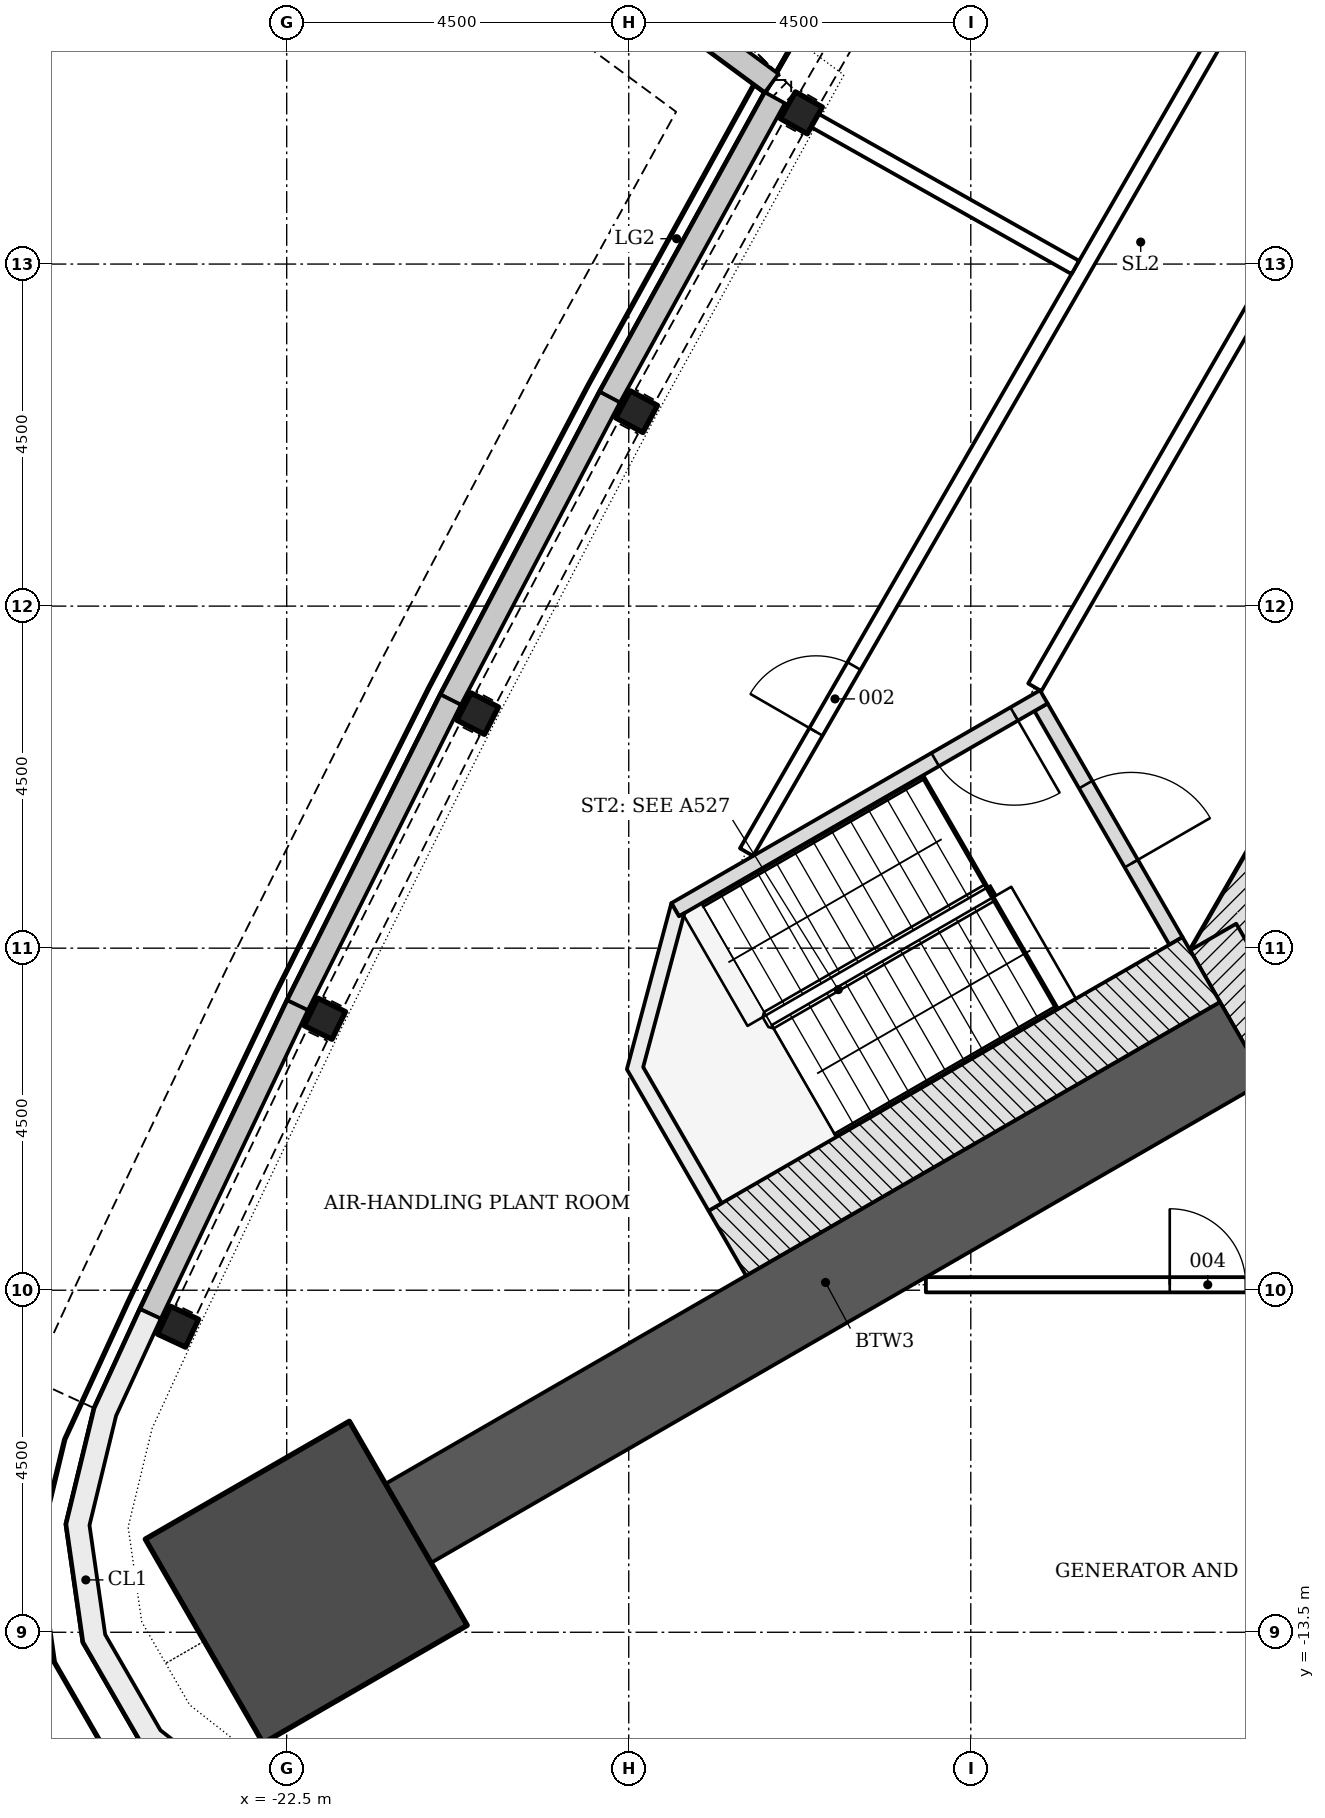
"""IFC4 building model, lengths in metres.
Left out: names, types, materials, properties, quantities, classifications, styles, units other than length and angle.
Written with IfcOpenShell. Run it as: python <this file> out.ifc"""

import sys

from ifc_helpers import new_model, si_unit, direction, frame, frame_2d, origin, origin_2d, place, context, subcontext, project, spatial, polyline, rectangle, i_section, outline, extrude, element, fill, save


model = new_model("IFC4")
c1 = context("Model", 3, precision=1e-05, world=origin(), true_north=direction((0.0, 1.0)))
c2 = subcontext(c1, "Body", "Model", "MODEL_VIEW")
j1 = project(units=[si_unit("LENGTHUNIT", "METRE"), si_unit("PLANEANGLEUNIT", "RADIAN")], contexts=[c1])
p1 = place(None, origin())
s1 = spatial("IfcSite", under=j1, at=p1, CompositionType="ELEMENT")
p2 = place(p1, origin())
s2 = spatial("IfcBuilding", under=s1, at=p2, CompositionType="ELEMENT")
p3 = place(p2, frame((0.0, 0.0, 87.0)))
s3 = spatial("IfcBuildingStorey", under=s2, at=p3, CompositionType="ELEMENT", Elevation=87.0)
p4 = place(p3, frame((-1.083, 11.281, -0.3), z_axis=(0.0, 0.0, 1.0), x_axis=(-0.500001446645, -0.866024568562, 0.0)))
e1 = element("IfcWall", 1, at=p4, inside=s3, PredefinedType="SHEAR", context=c2, shape_type="SweptSolid", body=[
    extrude(rectangle(XDim=18.458, YDim=0.7, at=frame_2d((9.229, 0.0))), origin(), (0.0, 0.0, 1.0), 4.6),
])
p5 = place(p4, frame((8.979, 0.0, 0.3)))
e2 = element("IfcOpeningElement", 2, at=p5, cuts=e1, PredefinedType="OPENING", context=c2, shape_type="SweptSolid", body=[
    extrude(rectangle(XDim=1.2, YDim=2.1, at=frame_2d((0.6, 1.05))), frame((0.0, 0.36, 0.0), z_axis=(0.0, -1.0, 0.0), x_axis=(1.0, 0.0, 0.0)), (0.0, 0.0, 1.0), 0.72),
])
p6 = place(p4, frame((11.029, 0.0, 0.3)))
e3 = element("IfcOpeningElement", 3, at=p6, cuts=e1, PredefinedType="OPENING", context=c2, shape_type="SweptSolid", body=[
    extrude(rectangle(XDim=1.2, YDim=2.1, at=frame_2d((0.6, 1.05))), frame((0.0, 0.36, 0.0), z_axis=(0.0, -1.0, 0.0), x_axis=(1.0, 0.0, 0.0)), (0.0, 0.0, 1.0), 0.72),
])
p7 = place(p3, frame((-10.311, -4.353, -0.3), z_axis=(0.0, 0.0, 1.0), x_axis=(0.500042739161, -0.866000726912, 0.0)))
e4 = element("IfcWall", 4, at=p7, inside=s3, PredefinedType="SHEAR", context=c2, shape_type="SweptSolid", body=[
    extrude(rectangle(XDim=2.771, YDim=0.7, at=frame_2d((1.386, 0.0))), origin(), (0.0, 0.0, 1.0), 4.6),
])
p8 = place(p3, frame((-9.922, -5.728, -0.3), z_axis=(0.0, 0.0, 1.0), x_axis=(-0.866029086277, -0.499993621681, 0.0)))
e5 = element("IfcWall", 5, at=p8, inside=s3, PredefinedType="SHEAR", context=c2, shape_type="SweptSolid", body=[
    extrude(rectangle(XDim=12.677, YDim=1.2, at=frame_2d((6.339, 0.0))), origin(), (0.0, 0.0, 1.0), 4.6),
])
p9 = place(p3, frame((-22.243, -12.842, -0.3), z_axis=(0.0, 0.0, 1.0), x_axis=(-0.866025403784, -0.5, 0.0)))
e6 = element("IfcColumn", 6, at=p9, inside=s3, PredefinedType="COLUMN", context=c2, shape_type="SweptSolid", body=[
    extrude(rectangle(XDim=3.1, YDim=3.1, at=origin_2d()), origin(), (0.0, 0.0, 1.0), 4.6),
])
for number, where, z_axis, x_axis in (
    (7, (-15.729, 6.49, -0.3), (0.0, 0.0, 1.0), (-0.491, -0.871, 0.0)),
    (8, (-17.897, 2.558, -0.3), (0.0, 0.0, 1.0), (-0.474, -0.88, 0.0)),
    (9, (-19.986, -1.415, -0.3), (0.0, 0.0, 1.0), (-0.457, -0.89, 0.0)),
    (10, (-21.998, -5.428, -0.3), (0.0, 0.0, 1.0), (-0.439, -0.898, 0.0)),
    (11, (-23.929, -9.48, -0.3), (0.0, 0.0, 1.0), (-0.421, -0.907, 0.0)),
):
    element("IfcColumn", number, at=place(p3, frame(where, z_axis=z_axis, x_axis=x_axis)), inside=s3, PredefinedType="COLUMN", context=c2, shape_type="SweptSolid", body=[
        extrude(i_section(OverallWidth=0.404, OverallDepth=0.406, WebThickness=0.027, FlangeThickness=0.044, FilletRadius=0.015, at=origin_2d()), origin(), (0.0, 0.0, 1.0), 4.6),
    ])
p10 = place(p3, origin())
e12 = element("IfcWall", 12, at=p10, inside=s3, PredefinedType="NOTDEFINED", context=c2, shape_type="SweptSolid", body=[
    extrude(outline(polyline([(-18.58, 8.509), (-16.208, 6.76), (-16.03, 7.001), (-18.402, 8.75), (-18.58, 8.509)])), origin(), (0.0, 0.0, 1.0), 1.2),
])
p11 = place(p3, origin())
e13 = element("IfcWall", 13, at=p11, inside=s3, PredefinedType="NOTDEFINED", context=c2, shape_type="SweptSolid", body=[
    extrude(outline(polyline([(-16.208, 6.76), (-18.381, 2.819), (-18.118, 2.674), (-15.945, 6.615), (-16.208, 6.76)])), origin(), (0.0, 0.0, 1.0), 1.2),
])
p12 = place(p3, origin())
e14 = element("IfcWall", 14, at=p12, inside=s3, PredefinedType="NOTDEFINED", context=c2, shape_type="SweptSolid", body=[
    extrude(outline(polyline([(-18.381, 2.819), (-20.476, -1.164), (-20.21, -1.303), (-18.115, 2.679), (-18.381, 2.819)])), origin(), (0.0, 0.0, 1.0), 1.2),
])
p13 = place(p3, origin())
e15 = element("IfcWall", 15, at=p13, inside=s3, PredefinedType="NOTDEFINED", context=c2, shape_type="SweptSolid", body=[
    extrude(outline(polyline([(-20.476, -1.164), (-22.492, -5.187), (-22.224, -5.321), (-20.208, -1.298), (-20.476, -1.164)])), origin(), (0.0, 0.0, 1.0), 1.2),
])
p14 = place(p3, origin())
e16 = element("IfcWall", 16, at=p14, inside=s3, PredefinedType="NOTDEFINED", context=c2, shape_type="SweptSolid", body=[
    extrude(outline(polyline([(-22.492, -5.187), (-24.428, -9.249), (-24.157, -9.378), (-22.221, -5.316), (-22.492, -5.187)])), origin(), (0.0, 0.0, 1.0), 1.2),
])
p15 = place(p3, origin())
e17 = element("IfcWall", 17, at=p15, inside=s3, PredefinedType="NOTDEFINED", context=c2, shape_type="SweptSolid", body=[
    extrude(outline(polyline([(-24.428, -9.249), (-25.03, -10.553), (-25.4, -12.077), (-25.177, -13.63), (-24.392, -14.989), (-23.159, -15.958), (-21.654, -16.4), (-20.224, -16.531), (-20.196, -16.232), (-21.597, -16.104), (-23.019, -15.687), (-24.161, -14.789), (-24.888, -13.53), (-25.094, -12.092), (-24.745, -10.652), (-24.156, -9.374), (-24.428, -9.249)])), origin(), (0.0, 0.0, 1.0), 4.3),
])
p16 = place(p3, frame((-12.576, -1.331, -0.3), z_axis=(0.0, 0.0, 1.0), x_axis=(0.499970499736, -0.8660424351, 0.0)))
e18 = element("IfcWall", 18, at=p16, inside=s3, PredefinedType="SHEAR", context=c2, shape_type="SweptSolid", body=[
    extrude(rectangle(XDim=3.55, YDim=0.2, at=frame_2d((1.775, 0.0))), origin(), (0.0, 0.0, 1.0), 4.6),
])
p17 = place(p16, frame((1.175, 0.0, 0.3)))
e19 = element("IfcOpeningElement", 19, at=p17, cuts=e18, PredefinedType="OPENING", context=c2, shape_type="SweptSolid", body=[
    extrude(rectangle(XDim=1.2, YDim=2.1, at=frame_2d((0.6, 1.05))), frame((0.0, 0.11, 0.0), z_axis=(0.0, -1.0, 0.0), x_axis=(1.0, 0.0, 0.0)), (0.0, 0.0, 1.0), 0.22),
])
p18 = place(p3, frame((-12.539, -1.194, -0.3), z_axis=(0.0, 0.0, 1.0), x_axis=(-0.866045472092, -0.499965239061, 0.0)))
e20 = element("IfcWall", 20, at=p18, inside=s3, PredefinedType="SHEAR", context=c2, shape_type="SweptSolid", body=[
    extrude(rectangle(XDim=5.6, YDim=0.2, at=frame_2d((2.8, 0.0))), origin(), (0.0, 0.0, 1.0), 4.6),
])
p19 = place(p18, frame((0.45, 0.0, 0.3)))
e21 = element("IfcOpeningElement", 21, at=p19, cuts=e20, PredefinedType="OPENING", context=c2, shape_type="SweptSolid", body=[
    extrude(rectangle(XDim=1.2, YDim=2.1, at=frame_2d((0.6, 1.05))), frame((0.0, 0.11, 0.0), z_axis=(0.0, -1.0, 0.0), x_axis=(1.0, 0.0, 0.0)), (0.0, 0.0, 1.0), 0.22),
])
p20 = place(p3, frame((-10.468, -4.782, -0.3), z_axis=(0.0, 0.0, 1.0), x_axis=(-0.866018442252, -0.500012057535, 0.0)))
e22 = element("IfcWall", 22, at=p20, inside=s3, PredefinedType="SHEAR", context=c2, shape_type="SweptSolid", body=[
    extrude(rectangle(XDim=7.2, YDim=0.986, at=frame_2d((3.6, 0.0))), origin(), (0.0, 0.0, 1.0), 4.6),
])
p21 = place(p3, frame((0.0, 0.0, -0.3)))
e23 = element("IfcWall", 23, at=p21, inside=s3, PredefinedType="SHEAR", context=c2, shape_type="SweptSolid", body=[
    extrude(outline(polyline([(-17.439, -3.907), (-18.025, -6.093), (-16.95, -7.955), (-16.777, -7.855), (-17.81, -6.065), (-17.267, -4.039), (-17.339, -4.081), (-17.339, -4.081), (-17.339, -4.081), (-17.339, -4.081), (-17.339, -4.081), (-17.339, -4.081), (-17.339, -4.081), (-17.339, -4.081), (-17.339, -4.081), (-17.339, -4.081), (-17.339, -4.081), (-17.339, -4.081), (-17.339, -4.081), (-17.339, -4.081), (-17.339, -4.081), (-17.339, -4.081), (-17.339, -4.081), (-17.439, -3.907)])), origin(), (0.0, 0.0, 1.0), 4.6),
])
p22 = place(p3, frame((-0.687, 19.667, 0.0), z_axis=(0.0, 0.0, 1.0), x_axis=(-0.500000491645, -0.866025119933, 0.0)))
e24 = element("IfcWall", 24, at=p22, inside=s3, PredefinedType="PARTITIONING", context=c2, shape_type="SweptSolid", body=[
    extrude(rectangle(XDim=23.943, YDim=0.2, at=frame_2d((11.971, 0.0))), origin(), (0.0, 0.0, 1.0), 3.678),
])
p23 = place(p22, frame((16.287, 0.0, 0.0)))
e25 = element("IfcOpeningElement", 25, at=p23, cuts=e24, PredefinedType="OPENING", context=c2, shape_type="SweptSolid", body=[
    extrude(rectangle(XDim=1.2, YDim=2.1, at=frame_2d((0.6, 1.05))), frame((0.0, 0.11, 0.0), z_axis=(0.0, -1.0, 0.0), x_axis=(1.0, 0.0, 0.0)), (0.0, 0.0, 1.0), 0.22),
])
p24 = place(p3, frame((-16.45, -3.237, 0.0), z_axis=(0.0, 0.0, 1.0), x_axis=(0.499997734893, 0.866026711541, 0.0)))
e26 = element("IfcWall", 26, at=p24, inside=s3, PredefinedType="PARTITIONING", context=c2, shape_type="SweptSolid", body=[
    extrude(rectangle(XDim=31.527, YDim=0.2, at=frame_2d((15.764, 0.0))), origin(), (0.0, 0.0, 1.0), 3.678),
])
p25 = place(p24, frame((19.615, 0.0, 0.0)))
e27 = element("IfcOpeningElement", 27, at=p25, cuts=e26, PredefinedType="OPENING", context=c2, shape_type="SweptSolid", body=[
    extrude(rectangle(XDim=1.0, YDim=2.1, at=frame_2d((0.5, 1.05))), frame((0.0, 0.11, 0.0), z_axis=(0.0, -1.0, 0.0), x_axis=(1.0, 0.0, 0.0)), (0.0, 0.0, 1.0), 0.22),
])
p26 = place(p24, frame((1.828, 0.0, 0.0)))
e28 = element("IfcOpeningElement", 28, at=p26, cuts=e26, PredefinedType="OPENING", context=c2, shape_type="SweptSolid", body=[
    extrude(rectangle(XDim=1.0, YDim=2.1, at=frame_2d((0.5, 1.05))), frame((0.0, 0.11, 0.0), z_axis=(0.0, -1.0, 0.0), x_axis=(1.0, 0.0, 0.0)), (0.0, 0.0, 1.0), 0.22),
])
p27 = place(p3, frame((-15.598, 6.416, 0.0), z_axis=(0.0, 0.0, 1.0), x_axis=(0.870920683573, -0.491423608433, 0.0)))
e29 = element("IfcWall", 29, at=p27, inside=s3, PredefinedType="PARTITIONING", context=c2, shape_type="SweptSolid", body=[
    extrude(rectangle(XDim=3.987, YDim=0.2, at=frame_2d((1.994, 0.0))), origin(), (0.0, 0.0, 1.0), 3.678),
])
p28 = place(p3, frame((-14.091, -8.928, 0.0), z_axis=(0.0, 0.0, 1.0), x_axis=(1.0, 0.0, 0.0)))
e30 = element("IfcWall", 30, at=p28, inside=s3, PredefinedType="PARTITIONING", context=c2, shape_type="SweptSolid", body=[
    extrude(rectangle(XDim=18.991, YDim=0.2, at=frame_2d((9.495, 0.0))), origin(), (0.0, 0.0, 1.0), 3.678),
])
p29 = place(p28, frame((3.208, 0.0, 0.0)))
e31 = element("IfcOpeningElement", 31, at=p29, cuts=e30, PredefinedType="OPENING", context=c2, shape_type="SweptSolid", body=[
    extrude(rectangle(XDim=1.0, YDim=2.1, at=frame_2d((0.5, 1.05))), frame((0.0, 0.11, 0.0), z_axis=(0.0, -1.0, 0.0), x_axis=(1.0, 0.0, 0.0)), (0.0, 0.0, 1.0), 0.22),
])
p30 = place(p28, frame((9.359, 0.0, 0.0)))
e32 = element("IfcOpeningElement", 32, at=p30, cuts=e30, PredefinedType="OPENING", context=c2, shape_type="SweptSolid", body=[
    extrude(rectangle(XDim=1.0, YDim=2.1, at=frame_2d((0.5, 1.05))), frame((0.0, 0.11, 0.0), z_axis=(0.0, -1.0, 0.0), x_axis=(1.0, 0.0, 0.0)), (0.0, 0.0, 1.0), 0.22),
])
p31 = place(p28, frame((13.49, 0.0, 0.0)))
e33 = element("IfcOpeningElement", 33, at=p31, cuts=e30, PredefinedType="OPENING", context=c2, shape_type="SweptSolid", body=[
    extrude(rectangle(XDim=1.0, YDim=2.1, at=frame_2d((0.5, 1.05))), frame((0.0, 0.11, 0.0), z_axis=(0.0, -1.0, 0.0), x_axis=(1.0, 0.0, 0.0)), (0.0, 0.0, 1.0), 0.22),
])
p32 = place(p28, frame((17.013, 0.0, 0.0)))
e34 = element("IfcOpeningElement", 34, at=p32, cuts=e30, PredefinedType="OPENING", context=c2, shape_type="SweptSolid", body=[
    extrude(rectangle(XDim=1.0, YDim=2.1, at=frame_2d((0.5, 1.05))), frame((0.0, 0.11, 0.0), z_axis=(0.0, -1.0, 0.0), x_axis=(1.0, 0.0, 0.0)), (0.0, 0.0, 1.0), 0.22),
])
p33 = place(p17, origin())
e35 = element("IfcDoor", 35, at=p33, inside=s3, OperationType="SINGLE_SWING_RIGHT", PredefinedType="DOOR", context=c2, shape_type="SweptSolid", body=[
    extrude(rectangle(XDim=1.2, YDim=2.1, at=frame_2d((0.6, 1.05))), frame((0.0, 0.025, 0.0), z_axis=(0.0, -1.0, 0.0), x_axis=(1.0, 0.0, 0.0)), (0.0, 0.0, 1.0), 0.05),
])
fill(e19, e35)
p34 = place(p19, origin())
e36 = element("IfcDoor", 36, at=p34, inside=s3, OperationType="SINGLE_SWING_LEFT", PredefinedType="DOOR", context=c2, shape_type="SweptSolid", body=[
    extrude(rectangle(XDim=1.2, YDim=2.1, at=frame_2d((0.6, 1.05))), frame((0.0, 0.025, 0.0), z_axis=(0.0, -1.0, 0.0), x_axis=(1.0, 0.0, 0.0)), (0.0, 0.0, 1.0), 0.05),
])
fill(e21, e36)
p35 = place(p26, origin())
e37 = element("IfcDoor", 37, at=p35, inside=s3, OperationType="SINGLE_SWING_LEFT", PredefinedType="DOOR", context=c2, shape_type="SweptSolid", body=[
    extrude(rectangle(XDim=1.0, YDim=2.1, at=frame_2d((0.5, 1.05))), frame((0.0, 0.025, 0.0), z_axis=(0.0, -1.0, 0.0), x_axis=(1.0, 0.0, 0.0)), (0.0, 0.0, 1.0), 0.05),
])
fill(e28, e37)
p36 = place(p29, origin())
e38 = element("IfcDoor", 38, at=p36, inside=s3, OperationType="SINGLE_SWING_LEFT", PredefinedType="DOOR", context=c2, shape_type="SweptSolid", body=[
    extrude(rectangle(XDim=1.0, YDim=2.1, at=frame_2d((0.5, 1.05))), frame((0.0, 0.025, 0.0), z_axis=(0.0, -1.0, 0.0), x_axis=(1.0, 0.0, 0.0)), (0.0, 0.0, 1.0), 0.05),
])
fill(e31, e38)
save(model, sys.argv[1])
